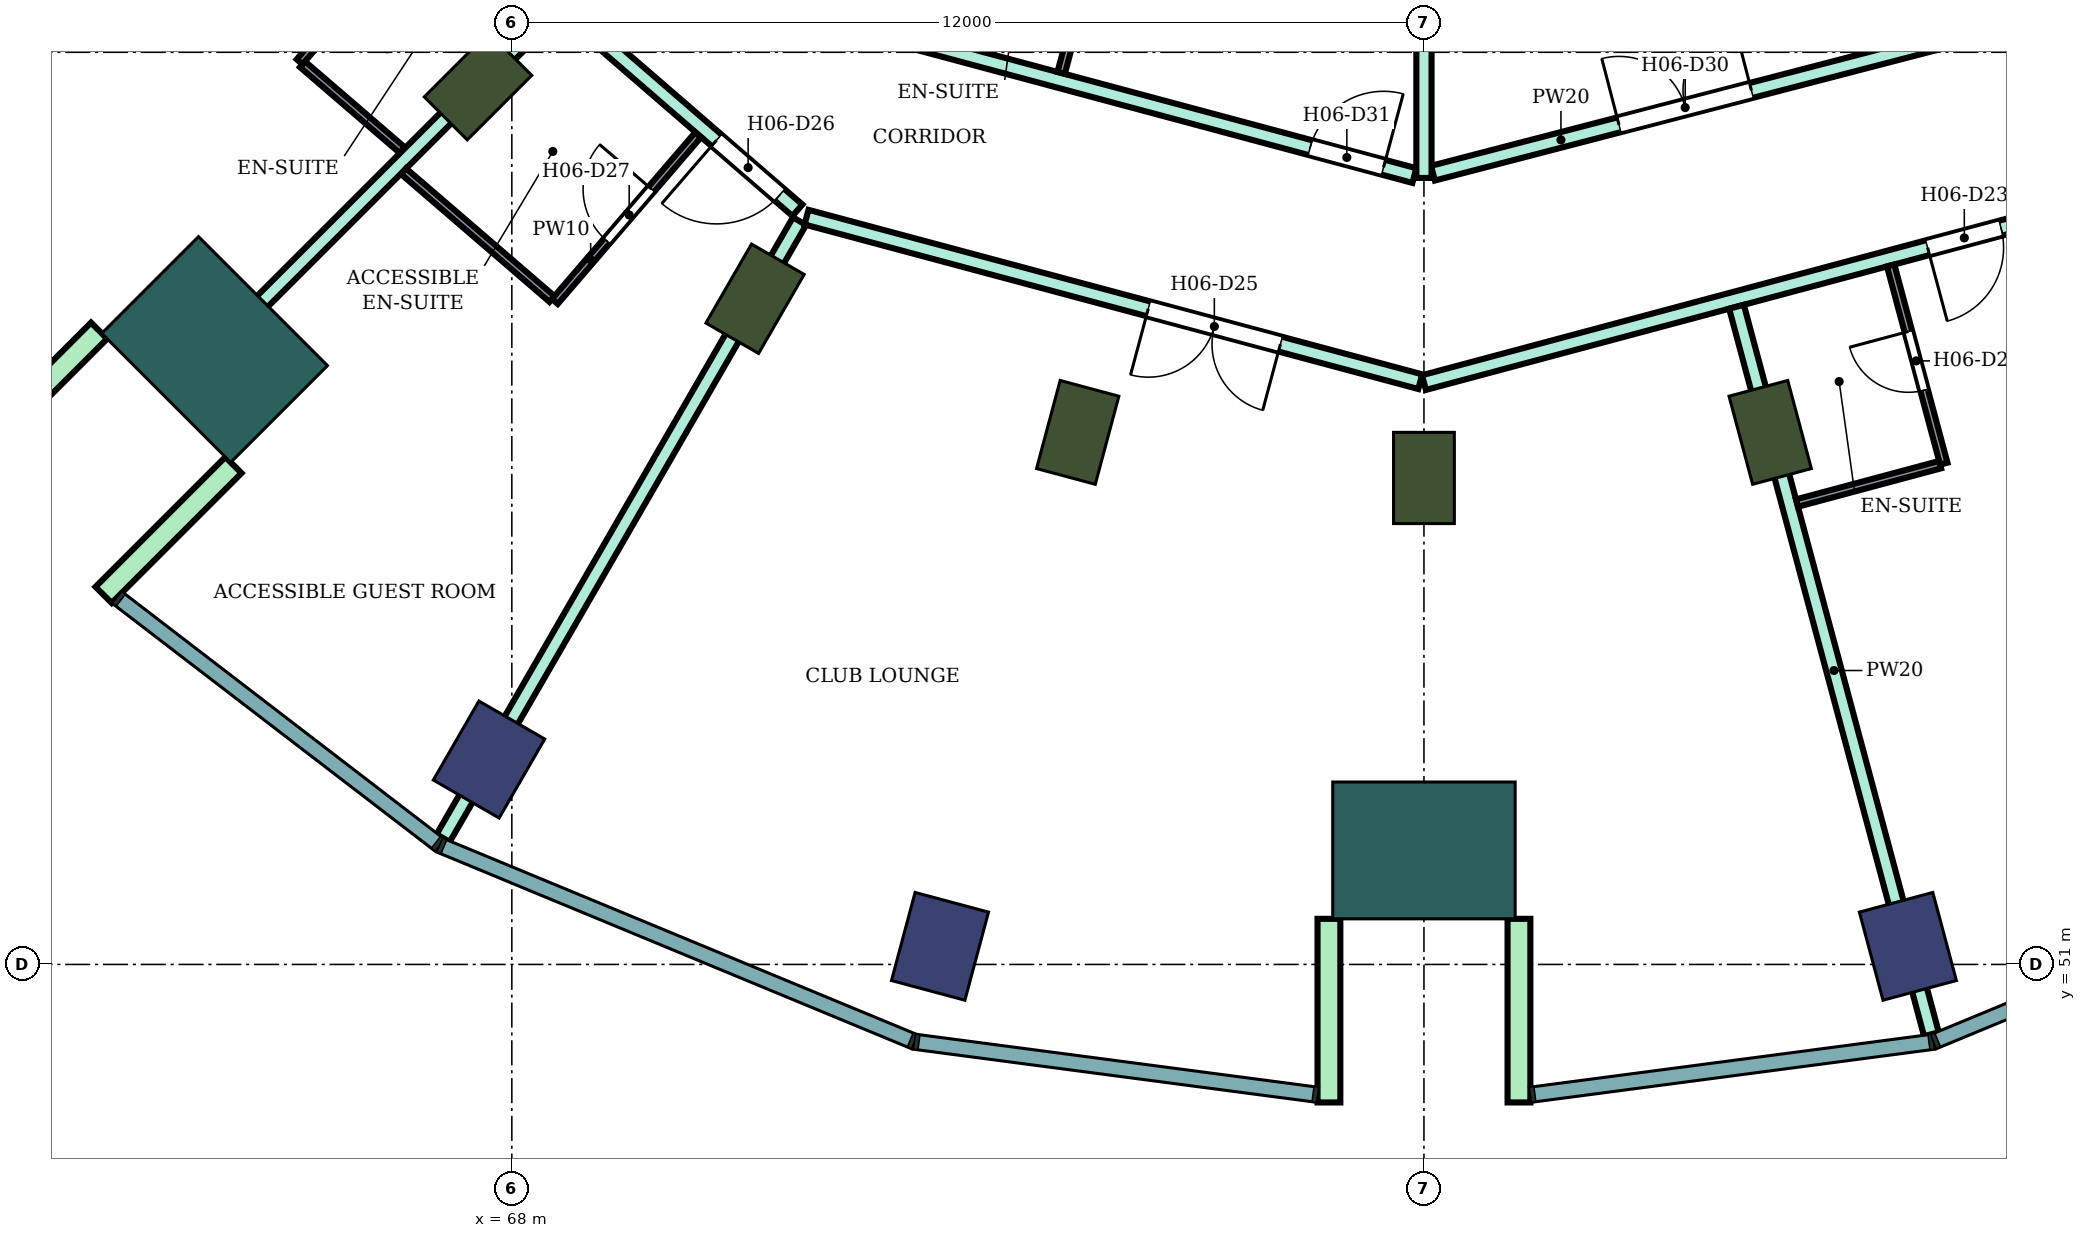
"""IFC4 building model, lengths in metres.
Left out: names, types, materials, properties, quantities, classifications, styles, units other than length and angle.
Written with IfcOpenShell. Run it as: python <this file> out.ifc"""

import sys

from ifc_helpers import new_model, si_unit, direction, frame, frame_2d, origin, origin_2d, place, context, subcontext, project, spatial, rectangle, extrude, element, fill, save


model = new_model("IFC4")
c1 = context("Model", 3, precision=1e-05, world=origin(), true_north=direction((0.0, 1.0)))
c2 = subcontext(c1, "Body", "Model", "MODEL_VIEW")
j1 = project(units=[si_unit("LENGTHUNIT", "METRE"), si_unit("PLANEANGLEUNIT", "RADIAN")], contexts=[c1])
p1 = place(None, origin())
s1 = spatial("IfcSite", under=j1, at=p1, CompositionType="ELEMENT")
p2 = place(p1, origin())
s2 = spatial("IfcBuilding", under=s1, at=p2, CompositionType="ELEMENT")
p3 = place(p2, frame((0.0, 0.0, 93.8)))
s3 = spatial("IfcBuildingStorey", under=s2, at=p3, CompositionType="ELEMENT", Elevation=93.8)
for number, where, z_axis, x_axis in (
    (1, (67.7, 53.696, 0.0), (0.0, 0.0, 1.0), (-0.5, -0.866, 0.0)),
    (2, (73.633, 51.238, 0.0), (0.0, 0.0, 1.0), (-0.259, -0.966, 0.0)),
    (3, (86.367, 51.238, 0.0), (0.0, 0.0, 1.0), (0.259, -0.966, 0.0)),
):
    element("IfcColumn", number, at=place(p3, frame(where, z_axis=z_axis, x_axis=x_axis)), inside=s3, PredefinedType="COLUMN", context=c2, shape_type="SweptSolid", body=[
        extrude(rectangle(XDim=1.2, YDim=1.0, at=origin_2d()), origin(), (0.0, 0.0, 1.0), 3.8),
    ])
for number, where, z_axis, x_axis in (
    (4, (67.555, 62.555, 0.0), (0.0, 0.0, 1.0), (-0.707, -0.707, 0.0)),
    (5, (71.2, 59.758, 0.0), (0.0, 0.0, 1.0), (-0.5, -0.866, 0.0)),
    (6, (75.445, 58.0, 0.0), (0.0, 0.0, 1.0), (-0.259, -0.966, 0.0)),
    (7, (80.0, 57.4, 0.0), (0.0, 0.0, 1.0), (0.0, -1.0, 0.0)),
    (8, (84.555, 58.0, 0.0), (0.0, 0.0, 1.0), (0.259, -0.966, 0.0)),
):
    element("IfcColumn", number, at=place(p3, frame(where, z_axis=z_axis, x_axis=x_axis)), inside=s3, PredefinedType="COLUMN", context=c2, shape_type="SweptSolid", body=[
        extrude(rectangle(XDim=1.2, YDim=0.8, at=origin_2d()), origin(), (0.0, 0.0, 1.0), 3.8),
    ])
for number, where, z_axis, x_axis in (
    (9, (64.09, 59.09, 0.0), (0.0, 0.0, 1.0), (-0.707, -0.707, 0.0)),
    (10, (80.0, 52.5, 0.0), (0.0, 0.0, 1.0), (0.0, -1.0, 0.0)),
):
    element("IfcColumn", number, at=place(p3, frame(where, z_axis=z_axis, x_axis=x_axis)), inside=s3, PredefinedType="COLUMN", context=c2, shape_type="SweptSolid", body=[
        extrude(rectangle(XDim=1.8, YDim=2.4, at=origin_2d()), origin(), (0.0, 0.0, 1.0), 3.8),
    ])
for number, where, z_axis, x_axis in (
    (11, (62.57, 59.338, 0.0), (0.0, 0.0, 1.0), (-0.707, -0.707, 0.0)),
    (12, (64.338, 57.57, 0.0), (0.0, 0.0, 1.0), (-0.707, -0.707, 0.0)),
    (13, (78.75, 51.6, 0.0), (0.0, 0.0, 1.0), (0.0, -1.0, 0.0)),
    (14, (81.25, 51.6, 0.0), (0.0, 0.0, 1.0), (0.0, -1.0, 0.0)),
):
    element("IfcWall", number, at=place(p3, frame(where, z_axis=z_axis, x_axis=x_axis)), inside=s3, PredefinedType="NOTDEFINED", context=c2, shape_type="SweptSolid", body=[
        extrude(rectangle(XDim=2.416, YDim=0.3, at=frame_2d((1.208, 0.0))), origin(), (0.0, 0.0, 1.0), 3.8),
    ])
p4 = place(p3, frame((63.594, 58.598, 0.0), z_axis=(0.0, 0.0, 1.0), x_axis=(0.707228748718, 0.706984792613, 0.0)))
e15 = element("IfcWall", 15, at=p4, inside=s3, PredefinedType="PARTITIONING", context=c2, shape_type="SweptSolid", body=[
    extrude(rectangle(XDim=7.005, YDim=0.2, at=frame_2d((3.503, 0.0))), origin(), (0.0, 0.0, 1.0), 3.35),
])
p5 = place(p3, frame((67.079, 64.968, 0.0), z_axis=(0.0, 0.0, 1.0), x_axis=(0.756371089567, -0.654142778656, 0.0)))
e16 = element("IfcWall", 16, at=p5, inside=s3, PredefinedType="PARTITIONING", context=c2, shape_type="SweptSolid", body=[
    extrude(rectangle(XDim=6.185, YDim=0.2, at=frame_2d((3.093, 0.0))), origin(), (0.0, 0.0, 1.0), 3.35),
])
p6 = place(p5, frame((4.778, 0.0, 0.0)))
e17 = element("IfcOpeningElement", 17, at=p6, cuts=e16, PredefinedType="OPENING", context=c2, shape_type="SweptSolid", body=[
    extrude(rectangle(XDim=1.1, YDim=2.1, at=frame_2d((0.55, 1.05))), frame((0.0, 0.11, 0.0), z_axis=(0.0, -1.0, 0.0), x_axis=(1.0, 0.0, 0.0)), (0.0, 0.0, 1.0), 0.22),
])
p7 = place(p3, frame((67.096, 52.662, 0.0), z_axis=(0.0, 0.0, 1.0), x_axis=(0.500222922337, 0.865896661253, 0.0)))
e18 = element("IfcWall", 18, at=p7, inside=s3, PredefinedType="PARTITIONING", context=c2, shape_type="SweptSolid", body=[
    extrude(rectangle(XDim=9.374, YDim=0.2, at=frame_2d((4.687, 0.0))), origin(), (0.0, 0.0, 1.0), 3.35),
])
p8 = place(p3, frame((71.877, 60.831, 0.0), z_axis=(0.0, 0.0, 1.0), x_axis=(0.965905026676, -0.258896657842, 0.0)))
e19 = element("IfcWall", 19, at=p8, inside=s3, PredefinedType="PARTITIONING", context=c2, shape_type="SweptSolid", body=[
    extrude(rectangle(XDim=8.36, YDim=0.2, at=frame_2d((4.18, 0.0))), origin(), (0.0, 0.0, 1.0), 3.35),
])
p9 = place(p8, frame((4.655, 0.0, 0.0)))
e20 = element("IfcOpeningElement", 20, at=p9, cuts=e19, PredefinedType="OPENING", context=c2, shape_type="SweptSolid", body=[
    extrude(rectangle(XDim=1.8, YDim=2.1, at=frame_2d((0.9, 1.05))), frame((0.0, 0.11, 0.0), z_axis=(0.0, -1.0, 0.0), x_axis=(1.0, 0.0, 0.0)), (0.0, 0.0, 1.0), 0.22),
])
p10 = place(p3, frame((73.297, 63.143, 0.0), z_axis=(0.0, 0.0, 1.0), x_axis=(0.965859030528, -0.25906820173, 0.0)))
e21 = element("IfcWall", 21, at=p10, inside=s3, PredefinedType="PARTITIONING", context=c2, shape_type="SweptSolid", body=[
    extrude(rectangle(XDim=6.81, YDim=0.2, at=frame_2d((3.405, 0.0))), origin(), (0.0, 0.0, 1.0), 3.35),
])
p11 = place(p10, frame((5.39, 0.0, 0.0)))
e22 = element("IfcOpeningElement", 22, at=p11, cuts=e21, PredefinedType="OPENING", context=c2, shape_type="SweptSolid", body=[
    extrude(rectangle(XDim=1.0, YDim=2.1, at=frame_2d((0.5, 1.05))), frame((0.0, 0.11, 0.0), z_axis=(0.0, -1.0, 0.0), x_axis=(1.0, 0.0, 0.0)), (0.0, 0.0, 1.0), 0.22),
])
p12 = place(p3, frame((80.119, 61.41, 0.0), z_axis=(0.0, 0.0, 1.0), x_axis=(0.967823361235, 0.251630565408, 0.0)))
e23 = element("IfcWall", 23, at=p12, inside=s3, PredefinedType="PARTITIONING", context=c2, shape_type="SweptSolid", body=[
    extrude(rectangle(XDim=6.958, YDim=0.2, at=frame_2d((3.479, 0.0))), origin(), (0.0, 0.0, 1.0), 3.35),
])
p13 = place(p12, frame((2.529, 0.0, 0.0)))
e24 = element("IfcOpeningElement", 24, at=p13, cuts=e23, PredefinedType="OPENING", context=c2, shape_type="SweptSolid", body=[
    extrude(rectangle(XDim=1.8, YDim=2.1, at=frame_2d((0.9, 1.05))), frame((0.0, 0.11, 0.0), z_axis=(0.0, -1.0, 0.0), x_axis=(1.0, 0.0, 0.0)), (0.0, 0.0, 1.0), 0.22),
])
p14 = place(p3, frame((80.0, 58.655, 0.0), z_axis=(0.0, 0.0, 1.0), x_axis=(0.965967338894, 0.258664068224, 0.0)))
e25 = element("IfcWall", 25, at=p14, inside=s3, PredefinedType="PARTITIONING", context=c2, shape_type="SweptSolid", body=[
    extrude(rectangle(XDim=8.36, YDim=0.2, at=frame_2d((4.18, 0.0))), origin(), (0.0, 0.0, 1.0), 3.35),
])
p15 = place(p14, frame((6.86, 0.0, 0.0)))
e26 = element("IfcOpeningElement", 26, at=p15, cuts=e25, PredefinedType="OPENING", context=c2, shape_type="SweptSolid", body=[
    extrude(rectangle(XDim=1.0, YDim=2.1, at=frame_2d((0.5, 1.05))), frame((0.0, 0.11, 0.0), z_axis=(0.0, -1.0, 0.0), x_axis=(1.0, 0.0, 0.0)), (0.0, 0.0, 1.0), 0.22),
])
p16 = place(p3, frame((80.0, 61.347, 0.0), z_axis=(0.0, 0.0, 1.0), x_axis=(0.0, 1.0, 0.0)))
e27 = element("IfcWall", 27, at=p16, inside=s3, PredefinedType="PARTITIONING", context=c2, shape_type="SweptSolid", body=[
    extrude(rectangle(XDim=5.953, YDim=0.2, at=frame_2d((2.977, 0.0))), origin(), (0.0, 0.0, 1.0), 3.35),
])
p17 = place(p3, frame((84.112, 59.652, 0.0), z_axis=(0.0, 0.0, 1.0), x_axis=(0.258792739659, -0.965932874428, 0.0)))
e28 = element("IfcWall", 28, at=p17, inside=s3, PredefinedType="PARTITIONING", context=c2, shape_type="SweptSolid", body=[
    extrude(rectangle(XDim=9.908, YDim=0.2, at=frame_2d((4.954, 0.0))), origin(), (0.0, 0.0, 1.0), 3.35),
])
p18 = place(p3, frame((65.246, 62.842, 0.0), z_axis=(0.0, 0.0, 1.0), x_axis=(0.758030338995, -0.652219292234, 0.0)))
e29 = element("IfcWall", 29, at=p18, inside=s3, PredefinedType="PARTITIONING", context=c2, shape_type="SweptSolid", body=[
    extrude(rectangle(XDim=1.73, YDim=0.1, at=frame_2d((0.865, 0.0))), origin(), (0.0, 0.0, 1.0), 3.35),
])
p19 = place(p3, frame((65.208, 62.875, 0.0), z_axis=(0.0, 0.0, 1.0), x_axis=(0.65205430601, 0.758172264076, 0.0)))
e30 = element("IfcWall", 30, at=p19, inside=s3, PredefinedType="PARTITIONING", context=c2, shape_type="SweptSolid", body=[
    extrude(rectangle(XDim=2.8, YDim=0.1, at=frame_2d((1.4, 0.0))), origin(), (0.0, 0.0, 1.0), 3.35),
])
p20 = place(p19, frame((0.85, 0.0, 0.0)))
e31 = element("IfcOpeningElement", 31, at=p20, cuts=e30, PredefinedType="OPENING", context=c2, shape_type="SweptSolid", body=[
    extrude(rectangle(XDim=0.8, YDim=2.1, at=frame_2d((0.4, 1.05))), frame((0.0, 0.06, 0.0), z_axis=(0.0, -1.0, 0.0), x_axis=(1.0, 0.0, 0.0)), (0.0, 0.0, 1.0), 0.12),
])
p21 = place(p3, frame((66.576, 61.435, 0.0), z_axis=(0.0, 0.0, 1.0), x_axis=(0.757970550281, -0.652288774169, 0.0)))
e32 = element("IfcWall", 32, at=p21, inside=s3, PredefinedType="PARTITIONING", context=c2, shape_type="SweptSolid", body=[
    extrude(rectangle(XDim=2.576, YDim=0.1, at=frame_2d((1.288, 0.0))), origin(), (0.0, 0.0, 1.0), 3.35),
])
p22 = place(p3, frame((68.566, 59.722, 0.0), z_axis=(0.0, 0.0, 1.0), x_axis=(0.65193146671, 0.758277892803, 0.0)))
e33 = element("IfcWall", 33, at=p22, inside=s3, PredefinedType="PARTITIONING", context=c2, shape_type="SweptSolid", body=[
    extrude(rectangle(XDim=2.89, YDim=0.1, at=frame_2d((1.445, 0.0))), origin(), (0.0, 0.0, 1.0), 3.35),
])
p23 = place(p22, frame((1.05, 0.0, 0.0)))
e34 = element("IfcOpeningElement", 34, at=p23, cuts=e33, PredefinedType="OPENING", context=c2, shape_type="SweptSolid", body=[
    extrude(rectangle(XDim=0.9, YDim=2.1, at=frame_2d((0.45, 1.05))), frame((0.0, 0.06, 0.0), z_axis=(0.0, -1.0, 0.0), x_axis=(1.0, 0.0, 0.0)), (0.0, 0.0, 1.0), 0.12),
])
p24 = place(p3, frame((75.227, 62.729, 0.0), z_axis=(0.0, 0.0, 1.0), x_axis=(0.258945475746, 0.965891940432, 0.0)))
e35 = element("IfcWall", 35, at=p24, inside=s3, PredefinedType="PARTITIONING", context=c2, shape_type="SweptSolid", body=[
    extrude(rectangle(XDim=2.7, YDim=0.1, at=frame_2d((1.35, 0.0))), origin(), (0.0, 0.0, 1.0), 3.35),
])
p25 = place(p24, frame((0.9, 0.0, 0.0)))
e36 = element("IfcOpeningElement", 36, at=p25, cuts=e35, PredefinedType="OPENING", context=c2, shape_type="SweptSolid", body=[
    extrude(rectangle(XDim=0.8, YDim=2.1, at=frame_2d((0.4, 1.05))), frame((0.0, 0.06, 0.0), z_axis=(0.0, -1.0, 0.0), x_axis=(1.0, 0.0, 0.0)), (0.0, 0.0, 1.0), 0.12),
])
p26 = place(p3, frame((84.908, 57.07, 0.0), z_axis=(0.0, 0.0, 1.0), x_axis=(0.965853538138, 0.25908867761, 0.0)))
e37 = element("IfcWall", 37, at=p26, inside=s3, PredefinedType="PARTITIONING", context=c2, shape_type="SweptSolid", body=[
    extrude(rectangle(XDim=1.95, YDim=0.1, at=frame_2d((0.975, 0.0))), origin(), (0.0, 0.0, 1.0), 3.35),
])
p27 = place(p3, frame((86.14, 60.196, 0.0), z_axis=(0.0, 0.0, 1.0), x_axis=(0.258945475746, -0.965891940432, 0.0)))
e38 = element("IfcWall", 38, at=p27, inside=s3, PredefinedType="PARTITIONING", context=c2, shape_type="SweptSolid", body=[
    extrude(rectangle(XDim=2.7, YDim=0.1, at=frame_2d((1.35, 0.0))), origin(), (0.0, 0.0, 1.0), 3.35),
])
p28 = place(p27, frame((0.9, 0.0, 0.0)))
e39 = element("IfcOpeningElement", 39, at=p28, cuts=e38, PredefinedType="OPENING", context=c2, shape_type="SweptSolid", body=[
    extrude(rectangle(XDim=0.8, YDim=2.1, at=frame_2d((0.4, 1.05))), frame((0.0, 0.06, 0.0), z_axis=(0.0, -1.0, 0.0), x_axis=(1.0, 0.0, 0.0)), (0.0, 0.0, 1.0), 0.12),
])
p29 = place(p15, frame((1.0, 0.0, 0.0), z_axis=(0.0, 0.0, 1.0), x_axis=(-1.0, 0.0, 0.0)))
e40 = element("IfcDoor", 40, at=p29, inside=s3, OperationType="SINGLE_SWING_RIGHT", PredefinedType="DOOR", context=c2, shape_type="SweptSolid", body=[
    extrude(rectangle(XDim=1.0, YDim=2.1, at=frame_2d((0.5, 1.05))), frame((0.0, 0.025, 0.0), z_axis=(0.0, -1.0, 0.0), x_axis=(1.0, 0.0, 0.0)), (0.0, 0.0, 1.0), 0.05),
])
fill(e26, e40)
p30 = place(p28, frame((0.8, 0.0, 0.0), z_axis=(0.0, 0.0, 1.0), x_axis=(-1.0, 0.0, 0.0)))
e41 = element("IfcDoor", 41, at=p30, inside=s3, OperationType="SINGLE_SWING_RIGHT", PredefinedType="DOOR", context=c2, shape_type="SweptSolid", body=[
    extrude(rectangle(XDim=0.8, YDim=2.1, at=frame_2d((0.4, 1.05))), frame((0.0, 0.025, 0.0), z_axis=(0.0, -1.0, 0.0), x_axis=(1.0, 0.0, 0.0)), (0.0, 0.0, 1.0), 0.05),
])
fill(e39, e41)
p31 = place(p9, frame((1.8, 0.0, 0.0), z_axis=(0.0, 0.0, 1.0), x_axis=(-1.0, 0.0, 0.0)))
e42 = element("IfcDoor", 42, at=p31, inside=s3, OperationType="DOUBLE_DOOR_SINGLE_SWING", PredefinedType="DOOR", context=c2, shape_type="SweptSolid", body=[
    extrude(rectangle(XDim=1.8, YDim=2.1, at=frame_2d((0.9, 1.05))), frame((0.0, 0.025, 0.0), z_axis=(0.0, -1.0, 0.0), x_axis=(1.0, 0.0, 0.0)), (0.0, 0.0, 1.0), 0.05),
])
fill(e20, e42)
p32 = place(p6, frame((1.1, 0.0, 0.0), z_axis=(0.0, 0.0, 1.0), x_axis=(-1.0, 0.0, 0.0)))
e43 = element("IfcDoor", 43, at=p32, inside=s3, OperationType="SINGLE_SWING_RIGHT", PredefinedType="DOOR", context=c2, shape_type="SweptSolid", body=[
    extrude(rectangle(XDim=1.1, YDim=2.1, at=frame_2d((0.55, 1.05))), frame((0.0, 0.025, 0.0), z_axis=(0.0, -1.0, 0.0), x_axis=(1.0, 0.0, 0.0)), (0.0, 0.0, 1.0), 0.05),
])
fill(e17, e43)
p33 = place(p23, origin())
e44 = element("IfcDoor", 44, at=p33, inside=s3, OperationType="SINGLE_SWING_RIGHT", PredefinedType="DOOR", context=c2, shape_type="SweptSolid", body=[
    extrude(rectangle(XDim=0.9, YDim=2.1, at=frame_2d((0.45, 1.05))), frame((0.0, 0.025, 0.0), z_axis=(0.0, -1.0, 0.0), x_axis=(1.0, 0.0, 0.0)), (0.0, 0.0, 1.0), 0.05),
])
fill(e34, e44)
p34 = place(p13, origin())
e45 = element("IfcDoor", 45, at=p34, inside=s3, OperationType="DOUBLE_DOOR_SINGLE_SWING", PredefinedType="DOOR", context=c2, shape_type="SweptSolid", body=[
    extrude(rectangle(XDim=1.8, YDim=2.1, at=frame_2d((0.9, 1.05))), frame((0.0, 0.025, 0.0), z_axis=(0.0, -1.0, 0.0), x_axis=(1.0, 0.0, 0.0)), (0.0, 0.0, 1.0), 0.05),
])
fill(e24, e45)
p35 = place(p11, origin())
e46 = element("IfcDoor", 46, at=p35, inside=s3, OperationType="SINGLE_SWING_RIGHT", PredefinedType="DOOR", context=c2, shape_type="SweptSolid", body=[
    extrude(rectangle(XDim=1.0, YDim=2.1, at=frame_2d((0.5, 1.05))), frame((0.0, 0.025, 0.0), z_axis=(0.0, -1.0, 0.0), x_axis=(1.0, 0.0, 0.0)), (0.0, 0.0, 1.0), 0.05),
])
fill(e22, e46)
save(model, sys.argv[1])
